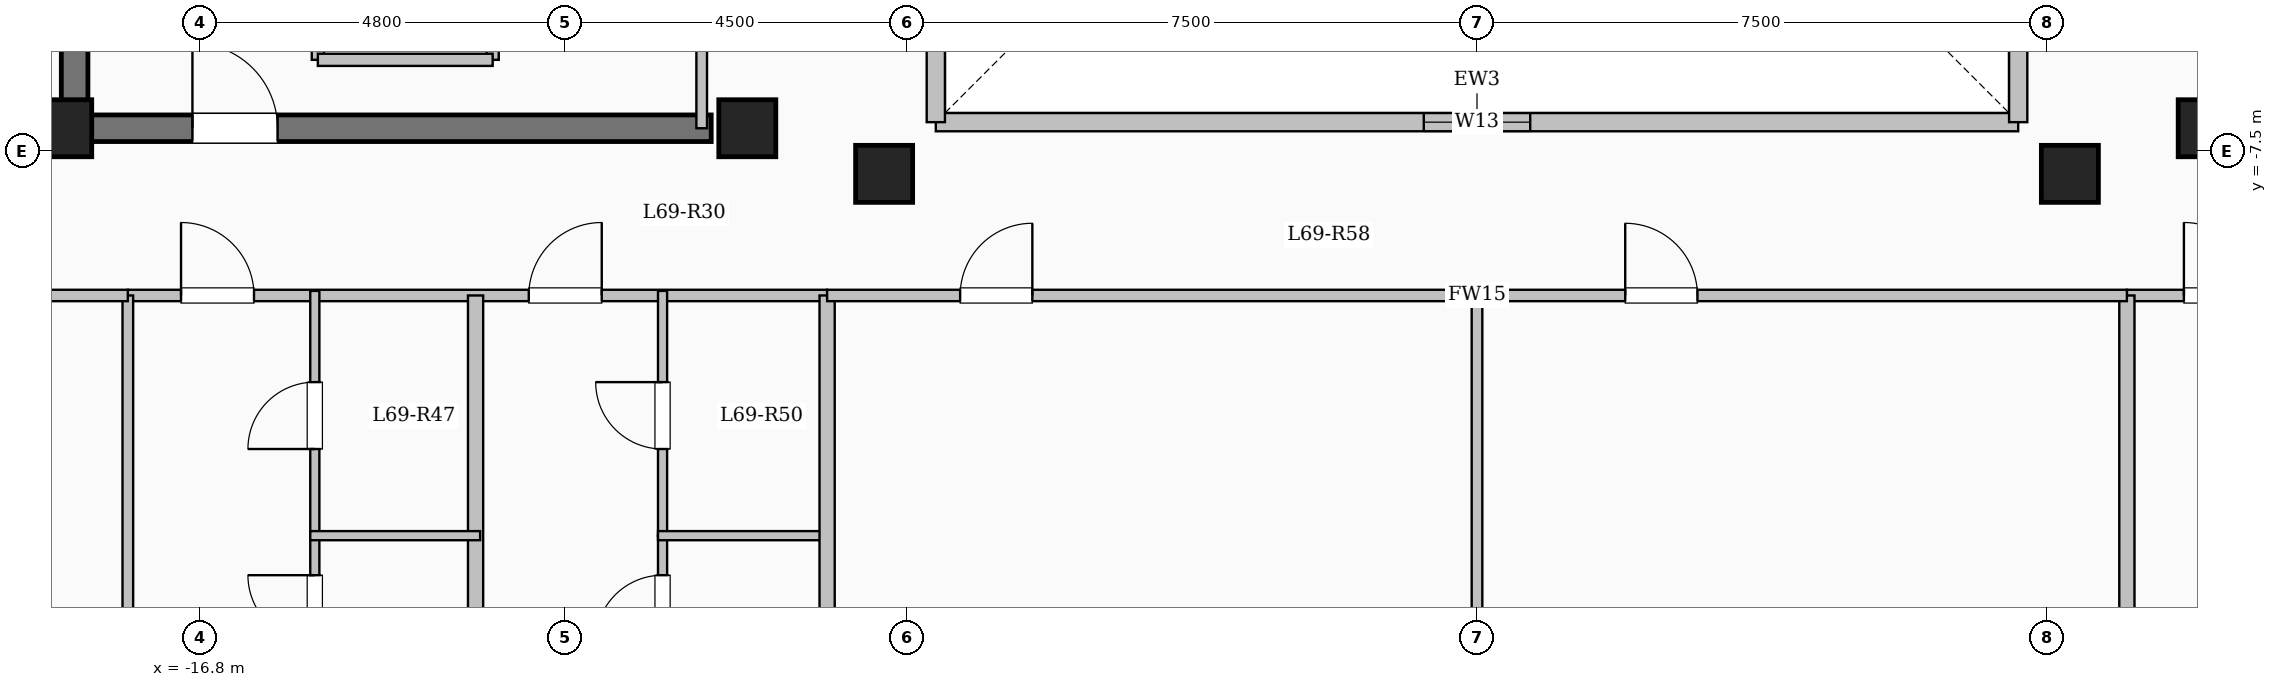
"""IFC4 building model, lengths in metres.
Left out: names, types, materials, properties, quantities, classifications, styles, units other than length and angle.
Written with IfcOpenShell. Run it as: python <this file> out.ifc"""

import sys

from ifc_helpers import new_model, si_unit, direction, frame, frame_2d, origin, origin_2d, place, context, subcontext, project, spatial, rectangle, extrude, element, fill, save


model = new_model("IFC4")
c1 = context("Model", 3, precision=1e-05, world=origin(), true_north=direction((0.0, 1.0)))
c2 = subcontext(c1, "Body", "Model", "MODEL_VIEW")
j1 = project(units=[si_unit("LENGTHUNIT", "METRE"), si_unit("PLANEANGLEUNIT", "RADIAN")], contexts=[c1])
p1 = place(None, origin())
s1 = spatial("IfcSite", under=j1, at=p1, CompositionType="ELEMENT")
p2 = place(p1, origin())
s2 = spatial("IfcBuilding", under=s1, at=p2, CompositionType="ELEMENT")
p3 = place(p2, frame((0.0, 0.0, 254.9)))
s3 = spatial("IfcBuildingStorey", under=s2, at=p3, CompositionType="ELEMENT", Elevation=254.9)
for number, where, z_axis, x_axis in (
    (1, (-7.8, -7.8, 0.0), (0.0, 0.0, 1.0), (1.0, 0.0, 0.0)),
    (2, (7.8, -7.8, 0.0), (0.0, 0.0, 1.0), (1.0, 0.0, 0.0)),
    (3, (-9.6, -7.2, 0.0), (0.0, 0.0, 1.0), (1.0, 0.0, 0.0)),
    (4, (9.6, -7.2, 0.0), (0.0, 0.0, 1.0), (1.0, 0.0, 0.0)),
    (5, (-18.6, -7.2, 0.0), (0.0, 0.0, 1.0), (1.0, 0.0, 0.0)),
):
    element("IfcColumn", number, at=place(p3, frame(where, z_axis=z_axis, x_axis=x_axis)), inside=s3, PredefinedType="COLUMN", context=c2, shape_type="SweptSolid", body=[
        extrude(rectangle(XDim=0.75, YDim=0.75, at=origin_2d()), origin(), (0.0, 0.0, 1.0), 3.35),
    ])
p4 = place(p3, frame((-7.12, -7.12, 0.0), z_axis=(0.0, 0.0, 1.0), x_axis=(1.0, 0.0, 0.0)))
e6 = element("IfcWall", 6, at=p4, inside=s3, PredefinedType="SOLIDWALL", context=c2, shape_type="SweptSolid", body=[
    extrude(rectangle(XDim=14.24, YDim=0.24, at=frame_2d((7.12, 0.0))), origin(), (0.0, 0.0, 1.0), 3.1),
])
p5 = place(p4, frame((6.42, 0.0, 0.95)))
e7 = element("IfcOpeningElement", 7, at=p5, cuts=e6, PredefinedType="OPENING", context=c2, shape_type="SweptSolid", body=[
    extrude(rectangle(XDim=1.4, YDim=1.5, at=frame_2d((0.7, 0.75))), frame((0.0, 0.13, 0.0), z_axis=(0.0, -1.0, 0.0), x_axis=(1.0, 0.0, 0.0)), (0.0, 0.0, 1.0), 0.26),
])
p6 = place(p3, frame((7.12, -7.12, 0.0), z_axis=(0.0, 0.0, 1.0), x_axis=(0.0, 1.0, 0.0)))
e8 = element("IfcWall", 8, at=p6, inside=s3, PredefinedType="SOLIDWALL", context=c2, shape_type="SweptSolid", body=[
    extrude(rectangle(XDim=14.24, YDim=0.24, at=frame_2d((7.12, 0.0))), origin(), (0.0, 0.0, 1.0), 3.1),
])
p7 = place(p6, frame((6.42, 0.0, 0.95)))
e9 = element("IfcOpeningElement", 9, at=p7, cuts=e8, PredefinedType="OPENING", context=c2, shape_type="SweptSolid", body=[
    extrude(rectangle(XDim=1.4, YDim=1.5, at=frame_2d((0.7, 0.75))), frame((0.0, 0.13, 0.0), z_axis=(0.0, -1.0, 0.0), x_axis=(1.0, 0.0, 0.0)), (0.0, 0.0, 1.0), 0.26),
])
p8 = place(p3, frame((-7.12, 7.12, 0.0), z_axis=(0.0, 0.0, 1.0), x_axis=(0.0, -1.0, 0.0)))
e10 = element("IfcWall", 10, at=p8, inside=s3, PredefinedType="SOLIDWALL", context=c2, shape_type="SweptSolid", body=[
    extrude(rectangle(XDim=14.24, YDim=0.24, at=frame_2d((7.12, 0.0))), origin(), (0.0, 0.0, 1.0), 3.1),
])
p9 = place(p8, frame((6.42, 0.0, 0.95)))
e11 = element("IfcOpeningElement", 11, at=p9, cuts=e10, PredefinedType="OPENING", context=c2, shape_type="SweptSolid", body=[
    extrude(rectangle(XDim=1.4, YDim=1.5, at=frame_2d((0.7, 0.75))), frame((0.0, 0.13, 0.0), z_axis=(0.0, -1.0, 0.0), x_axis=(1.0, 0.0, 0.0)), (0.0, 0.0, 1.0), 0.26),
])
p10 = place(p3, frame((-15.25, -6.3, 0.0), z_axis=(0.0, 0.0, 1.0), x_axis=(0.0, 1.0, 0.0)))
e12 = element("IfcWall", 12, at=p10, inside=s3, PredefinedType="SOLIDWALL", context=c2, shape_type="SweptSolid", body=[
    extrude(rectangle(XDim=2.6, YDim=0.16, at=frame_2d((1.3, 0.0))), origin(), (0.0, 0.0, 1.0), 3.1),
])
p11 = place(p10, frame((0.75, 0.0, 0.0)))
e13 = element("IfcOpeningElement", 13, at=p11, cuts=e12, PredefinedType="OPENING", context=c2, shape_type="SweptSolid", body=[
    extrude(rectangle(XDim=1.1, YDim=2.15, at=frame_2d((0.55, 1.075))), frame((0.0, 0.09, 0.0), z_axis=(0.0, -1.0, 0.0), x_axis=(1.0, 0.0, 0.0)), (0.0, 0.0, 1.0), 0.18),
])
p12 = place(p3, frame((-12.95, -6.3, 0.0), z_axis=(0.0, 0.0, 1.0), x_axis=(0.0, 1.0, 0.0)))
e14 = element("IfcWall", 14, at=p12, inside=s3, PredefinedType="SOLIDWALL", context=c2, shape_type="SweptSolid", body=[
    extrude(rectangle(XDim=2.6, YDim=0.16, at=frame_2d((1.3, 0.0))), origin(), (0.0, 0.0, 1.0), 3.1),
])
p13 = place(p3, frame((-15.25, -6.3, 0.0), z_axis=(0.0, 0.0, 1.0), x_axis=(1.0, 0.0, 0.0)))
e15 = element("IfcWall", 15, at=p13, inside=s3, PredefinedType="SOLIDWALL", context=c2, shape_type="SweptSolid", body=[
    extrude(rectangle(XDim=2.3, YDim=0.16, at=frame_2d((1.15, 0.0))), origin(), (0.0, 0.0, 1.0), 3.1),
])
p14 = place(p3, frame((-18.45, -7.375, 0.0), z_axis=(0.0, 0.0, 1.0), x_axis=(0.0, 1.0, 0.0)))
e16 = element("IfcWall", 16, at=p14, inside=s3, PredefinedType="SHEAR", context=c2, shape_type="SweptSolid", body=[
    extrude(rectangle(XDim=14.05, YDim=0.35, at=frame_2d((7.025, 0.0))), origin(), (0.0, 0.0, 1.0), 3.35),
])
p15 = place(p3, frame((-18.625, -7.2, 0.0), z_axis=(0.0, 0.0, 1.0), x_axis=(1.0, 0.0, 0.0)))
e17 = element("IfcWall", 17, at=p15, inside=s3, PredefinedType="SHEAR", context=c2, shape_type="SweptSolid", body=[
    extrude(rectangle(XDim=8.55, YDim=0.35, at=frame_2d((4.275, 0.0))), origin(), (0.0, 0.0, 1.0), 3.35),
])
p16 = place(p15, frame((1.725, 0.0, 0.0)))
e18 = element("IfcOpeningElement", 18, at=p16, cuts=e17, PredefinedType="OPENING", context=c2, shape_type="SweptSolid", body=[
    extrude(rectangle(XDim=1.12, YDim=2.15, at=frame_2d((0.56, 1.075))), frame((0.0, 0.185, 0.0), z_axis=(0.0, -1.0, 0.0), x_axis=(1.0, 0.0, 0.0)), (0.0, 0.0, 1.0), 0.37),
])
p17 = place(p3, frame((-10.2, -7.2, 0.0), z_axis=(0.0, 0.0, 1.0), x_axis=(0.0, 1.0, 0.0)))
e19 = element("IfcWall", 19, at=p17, inside=s3, PredefinedType="PARTITIONING", context=c2, shape_type="SweptSolid", body=[
    extrude(rectangle(XDim=9.12, YDim=0.14, at=frame_2d((4.56, 0.0))), origin(), (0.0, 0.0, 1.0), 3.1),
])
p18 = place(p17, frame((1.6, 0.0, 0.0)))
e20 = element("IfcOpeningElement", 20, at=p18, cuts=e19, PredefinedType="OPENING", context=c2, shape_type="SweptSolid", body=[
    extrude(rectangle(XDim=0.95, YDim=2.12, at=frame_2d((0.475, 1.06))), frame((0.0, 0.08, 0.0), z_axis=(0.0, -1.0, 0.0), x_axis=(1.0, 0.0, 0.0)), (0.0, 0.0, 1.0), 0.16),
])
p19 = place(p17, frame((6.6, 0.0, 0.0)))
e21 = element("IfcOpeningElement", 21, at=p19, cuts=e19, PredefinedType="OPENING", context=c2, shape_type="SweptSolid", body=[
    extrude(rectangle(XDim=0.95, YDim=2.12, at=frame_2d((0.475, 1.06))), frame((0.0, 0.08, 0.0), z_axis=(0.0, -1.0, 0.0), x_axis=(1.0, 0.0, 0.0)), (0.0, 0.0, 1.0), 0.16),
])
p20 = place(p3, frame((-17.75, -9.4, 0.0), z_axis=(0.0, 0.0, 1.0), x_axis=(1.0, 0.0, 0.0)))
e22 = element("IfcWall", 22, at=p20, inside=s3, PredefinedType="PARTITIONING", context=c2, shape_type="SweptSolid", body=[
    extrude(rectangle(XDim=9.2, YDim=0.15, at=frame_2d((4.6, 0.0))), origin(), (0.0, 0.0, 1.0), 3.1),
])
p21 = place(p20, frame((0.7, 0.0, 0.0)))
e23 = element("IfcOpeningElement", 23, at=p21, cuts=e22, PredefinedType="OPENING", context=c2, shape_type="SweptSolid", body=[
    extrude(rectangle(XDim=0.96, YDim=2.15, at=frame_2d((0.48, 1.075))), frame((0.0, 0.085, 0.0), z_axis=(0.0, -1.0, 0.0), x_axis=(1.0, 0.0, 0.0)), (0.0, 0.0, 1.0), 0.17),
])
p22 = place(p20, frame((5.275, 0.0, 0.0)))
e24 = element("IfcOpeningElement", 24, at=p22, cuts=e22, PredefinedType="OPENING", context=c2, shape_type="SweptSolid", body=[
    extrude(rectangle(XDim=0.96, YDim=2.15, at=frame_2d((0.48, 1.075))), frame((0.0, 0.085, 0.0), z_axis=(0.0, -1.0, 0.0), x_axis=(1.0, 0.0, 0.0)), (0.0, 0.0, 1.0), 0.17),
])
p23 = place(p3, frame((8.55, -9.4, 0.0), z_axis=(0.0, 0.0, 1.0), x_axis=(1.0, 0.0, 0.0)))
e25 = element("IfcWall", 25, at=p23, inside=s3, PredefinedType="PARTITIONING", context=c2, shape_type="SweptSolid", body=[
    extrude(rectangle(XDim=9.2, YDim=0.15, at=frame_2d((4.6, 0.0))), origin(), (0.0, 0.0, 1.0), 3.1),
])
p24 = place(p23, frame((0.75, 0.0, 0.0)))
e26 = element("IfcOpeningElement", 26, at=p24, cuts=e25, PredefinedType="OPENING", context=c2, shape_type="SweptSolid", body=[
    extrude(rectangle(XDim=0.96, YDim=2.15, at=frame_2d((0.48, 1.075))), frame((0.0, 0.085, 0.0), z_axis=(0.0, -1.0, 0.0), x_axis=(1.0, 0.0, 0.0)), (0.0, 0.0, 1.0), 0.17),
])
p25 = place(p3, frame((-13.175, -20.9, 0.0), z_axis=(0.0, 0.0, 1.0), x_axis=(0.0, 1.0, 0.0)))
e27 = element("IfcWall", 27, at=p25, inside=s3, PredefinedType="SOLIDWALL", context=c2, shape_type="SweptSolid", body=[
    extrude(rectangle(XDim=11.5, YDim=0.2, at=frame_2d((5.75, 0.0))), origin(), (0.0, 0.0, 1.0), 3.1),
])
p26 = place(p3, frame((-15.29, -20.9, 0.0), z_axis=(0.0, 0.0, 1.0), x_axis=(0.0, 1.0, 0.0)))
e28 = element("IfcWall", 28, at=p26, inside=s3, PredefinedType="PARTITIONING", context=c2, shape_type="SweptSolid", body=[
    extrude(rectangle(XDim=8.34, YDim=0.12, at=frame_2d((4.17, 0.0))), origin(), (0.0, 0.0, 1.0), 2.685),
])
p27 = place(p26, frame((6.94, 0.0, 0.0)))
e29 = element("IfcOpeningElement", 29, at=p27, cuts=e28, PredefinedType="OPENING", context=c2, shape_type="SweptSolid", body=[
    extrude(rectangle(XDim=0.88, YDim=2.1, at=frame_2d((0.44, 1.05))), frame((0.0, 0.07, 0.0), z_axis=(0.0, -1.0, 0.0), x_axis=(1.0, 0.0, 0.0)), (0.0, 0.0, 1.0), 0.14),
])
p28 = place(p3, frame((-15.29, -12.56, 0.0), z_axis=(0.0, 0.0, 1.0), x_axis=(0.0, 1.0, 0.0)))
e30 = element("IfcWall", 30, at=p28, inside=s3, PredefinedType="PARTITIONING", context=c2, shape_type="SweptSolid", body=[
    extrude(rectangle(XDim=3.22, YDim=0.12, at=frame_2d((1.61, 0.0))), origin(), (0.0, 0.0, 1.0), 2.685),
])
p29 = place(p28, frame((1.14, 0.0, 0.0)))
e31 = element("IfcOpeningElement", 31, at=p29, cuts=e30, PredefinedType="OPENING", context=c2, shape_type="SweptSolid", body=[
    extrude(rectangle(XDim=0.88, YDim=2.1, at=frame_2d((0.44, 1.05))), frame((0.0, 0.07, 0.0), z_axis=(0.0, -1.0, 0.0), x_axis=(1.0, 0.0, 0.0)), (0.0, 0.0, 1.0), 0.14),
])
p30 = place(p3, frame((-15.35, -12.56, 0.0), z_axis=(0.0, 0.0, 1.0), x_axis=(1.0, 0.0, 0.0)))
e32 = element("IfcWall", 32, at=p30, inside=s3, PredefinedType="PARTITIONING", context=c2, shape_type="SweptSolid", body=[
    extrude(rectangle(XDim=2.235, YDim=0.12, at=frame_2d((1.118, 0.0))), origin(), (0.0, 0.0, 1.0), 2.785),
])
p31 = place(p3, frame((-10.715, -20.97, 0.0), z_axis=(0.0, 0.0, 1.0), x_axis=(0.0, 1.0, 0.0)))
e33 = element("IfcWall", 33, at=p31, inside=s3, PredefinedType="PARTITIONING", context=c2, shape_type="SweptSolid", body=[
    extrude(rectangle(XDim=8.41, YDim=0.12, at=frame_2d((4.205, 0.0))), origin(), (0.0, 0.0, 1.0), 3.1),
])
p32 = place(p31, frame((7.01, 0.0, 0.0)))
e34 = element("IfcOpeningElement", 34, at=p32, cuts=e33, PredefinedType="OPENING", context=c2, shape_type="SweptSolid", body=[
    extrude(rectangle(XDim=0.88, YDim=2.1, at=frame_2d((0.44, 1.05))), frame((0.0, 0.07, 0.0), z_axis=(0.0, -1.0, 0.0), x_axis=(1.0, 0.0, 0.0)), (0.0, 0.0, 1.0), 0.14),
])
p33 = place(p3, frame((-10.715, -12.56, 0.0), z_axis=(0.0, 0.0, 1.0), x_axis=(0.0, 1.0, 0.0)))
e35 = element("IfcWall", 35, at=p33, inside=s3, PredefinedType="PARTITIONING", context=c2, shape_type="SweptSolid", body=[
    extrude(rectangle(XDim=3.22, YDim=0.12, at=frame_2d((1.61, 0.0))), origin(), (0.0, 0.0, 1.0), 3.1),
])
p34 = place(p33, frame((1.14, 0.0, 0.0)))
e36 = element("IfcOpeningElement", 36, at=p34, cuts=e35, PredefinedType="OPENING", context=c2, shape_type="SweptSolid", body=[
    extrude(rectangle(XDim=0.88, YDim=2.1, at=frame_2d((0.44, 1.05))), frame((0.0, 0.07, 0.0), z_axis=(0.0, -1.0, 0.0), x_axis=(1.0, 0.0, 0.0)), (0.0, 0.0, 1.0), 0.14),
])
p35 = place(p3, frame((-10.775, -12.56, 0.0), z_axis=(0.0, 0.0, 1.0), x_axis=(1.0, 0.0, 0.0)))
e37 = element("IfcWall", 37, at=p35, inside=s3, PredefinedType="PARTITIONING", context=c2, shape_type="SweptSolid", body=[
    extrude(rectangle(XDim=2.235, YDim=0.12, at=frame_2d((1.117, 0.0))), origin(), (0.0, 0.0, 1.0), 2.785),
])
for number, where, z_axis, x_axis in (
    (38, (-8.55, -21.504, 0.0), (0.0, 0.0, 1.0), (0.0, 1.0, 0.0)),
    (39, (8.55, -21.504, 0.0), (0.0, 0.0, 1.0), (0.0, 1.0, 0.0)),
):
    element("IfcWall", number, at=place(p3, frame(where, z_axis=z_axis, x_axis=x_axis)), inside=s3, PredefinedType="SOLIDWALL", context=c2, shape_type="SweptSolid", body=[
        extrude(rectangle(XDim=12.104, YDim=0.2, at=frame_2d((6.052, 0.0))), origin(), (0.0, 0.0, 1.0), 3.1),
    ])
p36 = place(p3, frame((-8.55, -9.4, 0.0), z_axis=(0.0, 0.0, 1.0), x_axis=(1.0, 0.0, 0.0)))
e40 = element("IfcWall", 40, at=p36, inside=s3, PredefinedType="PARTITIONING", context=c2, shape_type="SweptSolid", body=[
    extrude(rectangle(XDim=17.1, YDim=0.15, at=frame_2d((8.55, 0.0))), origin(), (0.0, 0.0, 1.0), 3.1),
])
p37 = place(p36, frame((1.75, 0.0, 0.0)))
e41 = element("IfcOpeningElement", 41, at=p37, cuts=e40, PredefinedType="OPENING", context=c2, shape_type="SweptSolid", body=[
    extrude(rectangle(XDim=0.95, YDim=2.15, at=frame_2d((0.475, 1.075))), frame((0.0, 0.085, 0.0), z_axis=(0.0, -1.0, 0.0), x_axis=(1.0, 0.0, 0.0)), (0.0, 0.0, 1.0), 0.17),
])
p38 = place(p36, frame((10.5, 0.0, 0.0)))
e42 = element("IfcOpeningElement", 42, at=p38, cuts=e40, PredefinedType="OPENING", context=c2, shape_type="SweptSolid", body=[
    extrude(rectangle(XDim=0.95, YDim=2.15, at=frame_2d((0.475, 1.075))), frame((0.0, 0.085, 0.0), z_axis=(0.0, -1.0, 0.0), x_axis=(1.0, 0.0, 0.0)), (0.0, 0.0, 1.0), 0.17),
])
p39 = place(p3, frame((0.0, -22.38, 0.0), z_axis=(0.0, 0.0, 1.0), x_axis=(0.0, 1.0, 0.0)))
e43 = element("IfcWall", 43, at=p39, inside=s3, PredefinedType="PARTITIONING", context=c2, shape_type="SweptSolid", body=[
    extrude(rectangle(XDim=12.98, YDim=0.14, at=frame_2d((6.49, 0.0))), origin(), (0.0, 0.0, 1.0), 3.1),
])
p40 = place(p3, frame((-22.68, -7.25, 0.0), z_axis=(0.0, 0.0, 1.0), x_axis=(1.0, 0.0, 0.0)))
e44 = element("IfcWall", 44, at=p40, inside=s3, PredefinedType="PARTITIONING", context=c2, shape_type="SweptSolid", body=[
    extrude(rectangle(XDim=4.23, YDim=0.15, at=frame_2d((2.115, 0.0))), origin(), (0.0, 0.0, 1.0), 3.1),
])
p41 = place(p40, frame((1.63, 0.0, 0.0)))
e45 = element("IfcOpeningElement", 45, at=p41, cuts=e44, PredefinedType="OPENING", context=c2, shape_type="SweptSolid", body=[
    extrude(rectangle(XDim=1.08, YDim=2.15, at=frame_2d((0.54, 1.075))), frame((0.0, 0.085, 0.0), z_axis=(0.0, -1.0, 0.0), x_axis=(1.0, 0.0, 0.0)), (0.0, 0.0, 1.0), 0.17),
])
p42 = place(p3, frame((-17.75, -17.55, 0.0), z_axis=(0.0, 0.0, 1.0), x_axis=(0.0, 1.0, 0.0)))
e46 = element("IfcWall", 46, at=p42, inside=s3, PredefinedType="PARTITIONING", context=c2, shape_type="SweptSolid", body=[
    extrude(rectangle(XDim=8.15, YDim=0.14, at=frame_2d((4.075, 0.0))), origin(), (0.0, 0.0, 1.0), 3.1),
])
p43 = place(p3, frame((-22.68, -9.4, 0.0), z_axis=(0.0, 0.0, 1.0), x_axis=(1.0, 0.0, 0.0)))
e47 = element("IfcWall", 47, at=p43, inside=s3, PredefinedType="PARTITIONING", context=c2, shape_type="SweptSolid", body=[
    extrude(rectangle(XDim=4.93, YDim=0.15, at=frame_2d((2.465, 0.0))), origin(), (0.0, 0.0, 1.0), 3.1),
])
p44 = place(p43, frame((1.99, 0.0, 0.0)))
e48 = element("IfcOpeningElement", 48, at=p44, cuts=e47, PredefinedType="OPENING", context=c2, shape_type="SweptSolid", body=[
    extrude(rectangle(XDim=0.95, YDim=2.15, at=frame_2d((0.475, 1.075))), frame((0.0, 0.085, 0.0), z_axis=(0.0, -1.0, 0.0), x_axis=(1.0, 0.0, 0.0)), (0.0, 0.0, 1.0), 0.17),
])
p45 = place(p5, origin())
e49 = element("IfcWindow", 49, at=p45, inside=s3, PartitioningType="SINGLE_PANEL", PredefinedType="WINDOW", context=c2, shape_type="SweptSolid", body=[
    extrude(rectangle(XDim=1.4, YDim=1.5, at=frame_2d((0.7, 0.75))), frame((0.0, 0.03, 0.0), z_axis=(0.0, -1.0, 0.0), x_axis=(1.0, 0.0, 0.0)), (0.0, 0.0, 1.0), 0.06),
])
fill(e7, e49)
p46 = place(p16, origin())
e50 = element("IfcDoor", 50, at=p46, inside=s3, OperationType="SINGLE_SWING_LEFT", PredefinedType="DOOR", context=c2, shape_type="SweptSolid", body=[
    extrude(rectangle(XDim=1.12, YDim=2.15, at=frame_2d((0.56, 1.075))), frame((0.0, 0.025, 0.0), z_axis=(0.0, -1.0, 0.0), x_axis=(1.0, 0.0, 0.0)), (0.0, 0.0, 1.0), 0.05),
])
fill(e18, e50)
p47 = place(p21, origin())
e51 = element("IfcDoor", 51, at=p47, inside=s3, OperationType="SINGLE_SWING_LEFT", PredefinedType="DOOR", context=c2, shape_type="SweptSolid", body=[
    extrude(rectangle(XDim=0.96, YDim=2.15, at=frame_2d((0.48, 1.075))), frame((0.0, 0.025, 0.0), z_axis=(0.0, -1.0, 0.0), x_axis=(1.0, 0.0, 0.0)), (0.0, 0.0, 1.0), 0.05),
])
fill(e23, e51)
p48 = place(p27, origin())
e52 = element("IfcDoor", 52, at=p48, inside=s3, OperationType="SINGLE_SWING_RIGHT", PredefinedType="DOOR", context=c2, shape_type="SweptSolid", body=[
    extrude(rectangle(XDim=0.88, YDim=2.1, at=frame_2d((0.44, 1.05))), frame((0.0, 0.025, 0.0), z_axis=(0.0, -1.0, 0.0), x_axis=(1.0, 0.0, 0.0)), (0.0, 0.0, 1.0), 0.05),
])
fill(e29, e52)
p49 = place(p29, origin())
e53 = element("IfcDoor", 53, at=p49, inside=s3, OperationType="SINGLE_SWING_LEFT", PredefinedType="DOOR", context=c2, shape_type="SweptSolid", body=[
    extrude(rectangle(XDim=0.88, YDim=2.1, at=frame_2d((0.44, 1.05))), frame((0.0, 0.025, 0.0), z_axis=(0.0, -1.0, 0.0), x_axis=(1.0, 0.0, 0.0)), (0.0, 0.0, 1.0), 0.05),
])
fill(e31, e53)
p50 = place(p22, origin())
e54 = element("IfcDoor", 54, at=p50, inside=s3, OperationType="SINGLE_SWING_RIGHT", PredefinedType="DOOR", context=c2, shape_type="SweptSolid", body=[
    extrude(rectangle(XDim=0.96, YDim=2.15, at=frame_2d((0.48, 1.075))), frame((0.0, 0.025, 0.0), z_axis=(0.0, -1.0, 0.0), x_axis=(1.0, 0.0, 0.0)), (0.0, 0.0, 1.0), 0.05),
])
fill(e24, e54)
p51 = place(p32, origin())
e55 = element("IfcDoor", 55, at=p51, inside=s3, OperationType="SINGLE_SWING_LEFT", PredefinedType="DOOR", context=c2, shape_type="SweptSolid", body=[
    extrude(rectangle(XDim=0.88, YDim=2.1, at=frame_2d((0.44, 1.05))), frame((0.0, 0.025, 0.0), z_axis=(0.0, -1.0, 0.0), x_axis=(1.0, 0.0, 0.0)), (0.0, 0.0, 1.0), 0.05),
])
fill(e34, e55)
p52 = place(p34, origin())
e56 = element("IfcDoor", 56, at=p52, inside=s3, OperationType="SINGLE_SWING_RIGHT", PredefinedType="DOOR", context=c2, shape_type="SweptSolid", body=[
    extrude(rectangle(XDim=0.88, YDim=2.1, at=frame_2d((0.44, 1.05))), frame((0.0, 0.025, 0.0), z_axis=(0.0, -1.0, 0.0), x_axis=(1.0, 0.0, 0.0)), (0.0, 0.0, 1.0), 0.05),
])
fill(e36, e56)
p53 = place(p24, origin())
e57 = element("IfcDoor", 57, at=p53, inside=s3, OperationType="SINGLE_SWING_LEFT", PredefinedType="DOOR", context=c2, shape_type="SweptSolid", body=[
    extrude(rectangle(XDim=0.96, YDim=2.15, at=frame_2d((0.48, 1.075))), frame((0.0, 0.025, 0.0), z_axis=(0.0, -1.0, 0.0), x_axis=(1.0, 0.0, 0.0)), (0.0, 0.0, 1.0), 0.05),
])
fill(e26, e57)
p54 = place(p37, origin())
e58 = element("IfcDoor", 58, at=p54, inside=s3, OperationType="SINGLE_SWING_RIGHT", PredefinedType="DOOR", context=c2, shape_type="SweptSolid", body=[
    extrude(rectangle(XDim=0.95, YDim=2.15, at=frame_2d((0.475, 1.075))), frame((0.0, 0.025, 0.0), z_axis=(0.0, -1.0, 0.0), x_axis=(1.0, 0.0, 0.0)), (0.0, 0.0, 1.0), 0.05),
])
fill(e41, e58)
p55 = place(p38, origin())
e59 = element("IfcDoor", 59, at=p55, inside=s3, OperationType="SINGLE_SWING_LEFT", PredefinedType="DOOR", context=c2, shape_type="SweptSolid", body=[
    extrude(rectangle(XDim=0.95, YDim=2.15, at=frame_2d((0.475, 1.075))), frame((0.0, 0.025, 0.0), z_axis=(0.0, -1.0, 0.0), x_axis=(1.0, 0.0, 0.0)), (0.0, 0.0, 1.0), 0.05),
])
fill(e42, e59)
save(model, sys.argv[1])
